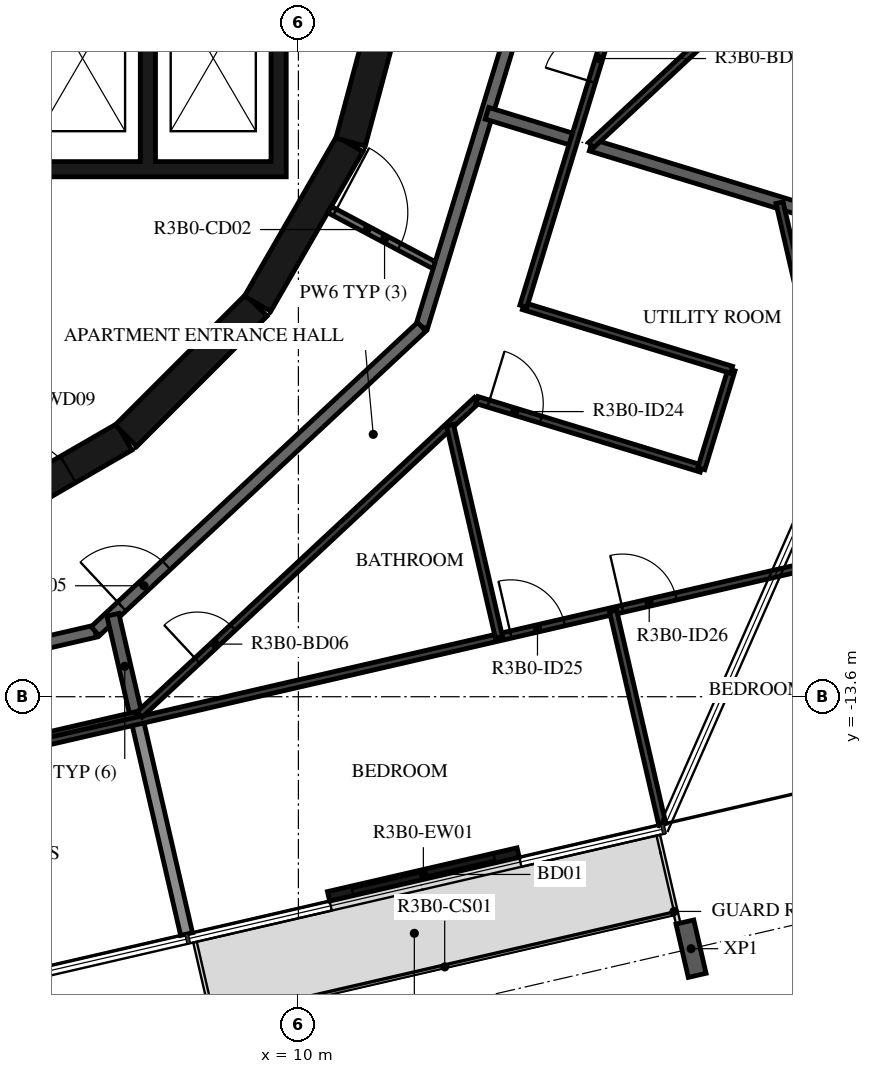
"""IFC4 building model, lengths in metres.
Left out: names, types, materials, properties, quantities, classifications, styles, units other than length and angle.
Written with IfcOpenShell. Run it as: python <this file> out.ifc"""

import sys

from ifc_helpers import new_model, si_unit, direction, frame, frame_2d, origin, origin_2d, place, context, subcontext, project, spatial, polyline, rectangle, i_section, outline, extrude, element, fill, save


model = new_model("IFC4")
c1 = context("Model", 3, precision=1e-05, world=origin(), true_north=direction((0.0, 1.0)))
c2 = subcontext(c1, "Body", "Model", "MODEL_VIEW")
j1 = project(units=[si_unit("LENGTHUNIT", "METRE"), si_unit("PLANEANGLEUNIT", "RADIAN")], contexts=[c1])
p1 = place(None, origin())
s1 = spatial("IfcSite", under=j1, at=p1, CompositionType="ELEMENT")
p2 = place(p1, origin())
s2 = spatial("IfcBuilding", under=s1, at=p2, CompositionType="ELEMENT")
p3 = place(p2, frame((0.0, 0.0, 127.4)))
s3 = spatial("IfcBuildingStorey", under=s2, at=p3, CompositionType="ELEMENT", Elevation=127.4)
p4 = place(p3, frame((16.457, -17.744, -0.38), z_axis=(0.0, 0.0, 1.0), x_axis=(-0.974370073419, -0.224951016948, 0.0)))
e1 = element("IfcColumn", 1, at=p4, inside=s3, PredefinedType="COLUMN", context=c2, shape_type="SweptSolid", body=[
    extrude(i_section(OverallWidth=0.3, OverallDepth=0.9, WebThickness=0.019, FlangeThickness=0.035, FilletRadius=0.03, at=origin_2d()), origin(), (0.0, 0.0, 1.0), 3.5),
])
p5 = place(p3, frame((10.496, -16.883, 0.0), z_axis=(0.0, 0.0, 1.0), x_axis=(0.974364187477, 0.224976510247, 0.0)))
e2 = element("IfcWall", 2, at=p5, inside=s3, PredefinedType="STANDARD", context=c2, shape_type="SweptSolid", body=[
    extrude(rectangle(XDim=3.2, YDim=0.16, at=frame_2d((1.6, 0.0))), origin(), (0.0, 0.0, 1.0), 3.12),
])
p6 = place(p5, frame((0.4, 0.0, 0.0)))
e3 = element("IfcOpeningElement", 3, at=p6, cuts=e2, PredefinedType="OPENING", context=c2, shape_type="SweptSolid", body=[
    extrude(rectangle(XDim=2.4, YDim=2.4, at=frame_2d((1.2, 1.2))), frame((0.0, 0.09, 0.0), z_axis=(0.0, -1.0, 0.0), x_axis=(1.0, 0.0, 0.0)), (0.0, 0.0, 1.0), 0.18),
])
p7 = place(p3, frame((4.51, -10.845, 0.0), z_axis=(0.0, 0.0, 1.0), x_axis=(0.865975092491, 0.500087131594, 0.0)))
e4 = element("IfcWall", 4, at=p7, inside=s3, PredefinedType="SHEAR", context=c2, shape_type="SweptSolid", body=[
    extrude(rectangle(XDim=3.033, YDim=0.5, at=frame_2d((1.516, 0.0))), origin(), (0.0, 0.0, 1.0), 3.12),
])
p8 = place(p7, frame((1.066, 0.0, 0.0)))
e5 = element("IfcOpeningElement", 5, at=p8, cuts=e4, PredefinedType="OPENING", context=c2, shape_type="SweptSolid", body=[
    extrude(rectangle(XDim=0.9, YDim=2.1, at=frame_2d((0.45, 1.05))), frame((0.0, 0.26, 0.0), z_axis=(0.0, -1.0, 0.0), x_axis=(1.0, 0.0, 0.0)), (0.0, 0.0, 1.0), 0.52),
])
p9 = place(p3, frame((7.164, -9.308, 0.0), z_axis=(0.0, 0.0, 1.0), x_axis=(0.707106781187, 0.707106781187, 0.0)))
e6 = element("IfcWall", 6, at=p9, inside=s3, PredefinedType="SHEAR", context=c2, shape_type="SweptSolid", body=[
    extrude(rectangle(XDim=3.032, YDim=0.5, at=frame_2d((1.516, 0.0))), origin(), (0.0, 0.0, 1.0), 3.12),
])
for number, where, z_axis, x_axis in (
    (7, (9.329, -7.137, 0.0), (0.0, 0.0, 1.0), (0.5, 0.866, 0.0)),
    (8, (10.858, -4.479, 0.0), (0.0, 0.0, 1.0), (0.259, 0.966, 0.0)),
):
    element("IfcWall", number, at=place(p3, frame(where, z_axis=z_axis, x_axis=x_axis)), inside=s3, PredefinedType="SHEAR", context=c2, shape_type="SweptSolid", body=[
        extrude(rectangle(XDim=3.033, YDim=0.5, at=frame_2d((1.516, 0.0))), origin(), (0.0, 0.0, 1.0), 3.12),
    ])
p10 = place(p3, origin())
e9 = element("IfcWall", 9, at=p10, inside=s3, PredefinedType="SHEAR", context=c2, shape_type="SweptSolid", body=[
    extrude(outline(polyline([(9.8, -5.05), (9.8, -4.8), (9.8, -1.9), (9.55, -1.9), (9.55, -4.8), (7.65, -4.8), (7.65, -1.9), (7.4, -1.9), (7.4, -4.8), (5.5, -4.8), (5.5, -1.9), (5.25, -1.9), (5.25, -4.8), (3.35, -4.8), (3.35, -1.9), (3.1, -1.9), (3.1, -4.8), (1.2, -4.8), (1.2, -1.9), (0.95, -1.9), (0.95, -4.8), (-0.95, -4.8), (-0.95, -1.9), (-1.2, -1.9), (-1.2, -4.8), (-5.25, -4.8), (-5.25, -1.9), (-5.5, -1.9), (-5.5, -4.8), (-7.4, -4.8), (-7.4, -1.9), (-7.65, -1.9), (-7.65, -4.8), (-9.55, -4.8), (-9.55, -1.9), (-9.8, -1.9), (-9.8, -4.8), (-9.8, -5.05), (9.8, -5.05)])), origin(), (0.0, 0.0, 1.0), 3.12),
])
p11 = place(p3, frame((10.511, -5.589, 0.0), z_axis=(0.0, 0.0, 1.0), x_axis=(0.882987820808, -0.469395897196, 0.0)))
e10 = element("IfcWall", 10, at=p11, inside=s3, PredefinedType="PARTITIONING", context=c2, shape_type="SweptSolid", body=[
    extrude(rectangle(XDim=2.052, YDim=0.12, at=frame_2d((1.026, 0.0))), origin(), (0.0, 0.0, 1.0), 3.12),
])
p12 = place(p11, frame((0.1, 0.0, 0.0)))
e11 = element("IfcOpeningElement", 11, at=p12, cuts=e10, PredefinedType="OPENING", context=c2, shape_type="SweptSolid", body=[
    extrude(rectangle(XDim=1.2, YDim=2.1, at=frame_2d((0.6, 1.05))), frame((0.0, 0.07, 0.0), z_axis=(0.0, -1.0, 0.0), x_axis=(1.0, 0.0, 0.0)), (0.0, 0.0, 1.0), 0.14),
])
p13 = place(p3, frame((12.028, -7.516, 0.0), z_axis=(0.0, 0.0, 1.0), x_axis=(0.292365533182, 0.956306642771, 0.0)))
e12 = element("IfcWall", 12, at=p13, inside=s3, PredefinedType="STANDARD", context=c2, shape_type="SweptSolid", body=[
    extrude(rectangle(XDim=7.342, YDim=0.2, at=frame_2d((3.671, 0.0))), origin(), (0.0, 0.0, 1.0), 3.12),
])
p14 = place(p3, frame((-0.495, -14.175, 0.0), z_axis=(0.0, 0.0, 1.0), x_axis=(0.974376622151, 0.224922649383, 0.0)))
e13 = element("IfcWall", 13, at=p14, inside=s3, PredefinedType="STANDARD", context=c2, shape_type="SweptSolid", body=[
    extrude(rectangle(XDim=7.342, YDim=0.2, at=frame_2d((3.671, 0.0))), origin(), (0.0, 0.0, 1.0), 3.12),
])
p15 = place(p3, frame((6.659, -12.523, 0.0), z_axis=(0.0, 0.0, 1.0), x_axis=(0.731350455479, 0.682001841105, 0.0)))
e14 = element("IfcWall", 14, at=p15, inside=s3, PredefinedType="STANDARD", context=c2, shape_type="SweptSolid", body=[
    extrude(rectangle(XDim=7.342, YDim=0.2, at=frame_2d((3.671, 0.0))), origin(), (0.0, 0.0, 1.0), 3.12),
])
p16 = place(p15, frame((0.597, 0.0, 0.0)))
e15 = element("IfcOpeningElement", 15, at=p16, cuts=e14, PredefinedType="OPENING", context=c2, shape_type="SweptSolid", body=[
    extrude(rectangle(XDim=1.0, YDim=2.1, at=frame_2d((0.5, 1.05))), frame((0.0, 0.11, 0.0), z_axis=(0.0, -1.0, 0.0), x_axis=(1.0, 0.0, 0.0)), (0.0, 0.0, 1.0), 0.22),
])
p17 = place(p3, frame((7.34, -13.946, 0.0), z_axis=(0.0, 0.0, 1.0), x_axis=(-0.224849249613, 0.974393562658, 0.0)))
e16 = element("IfcWall", 16, at=p17, inside=s3, PredefinedType="STANDARD", context=c2, shape_type="SweptSolid", body=[
    extrude(rectangle(XDim=1.738, YDim=0.2, at=frame_2d((0.869, 0.0))), origin(), (0.0, 0.0, 1.0), 3.12),
])
p18 = place(p3, frame((8.161, -17.504, 0.0), z_axis=(0.0, 0.0, 1.0), x_axis=(-0.224943703639, 0.9743717618, 0.0)))
e17 = element("IfcWall", 17, at=p18, inside=s3, PredefinedType="STANDARD", context=c2, shape_type="SweptSolid", body=[
    extrude(rectangle(XDim=3.6, YDim=0.2, at=frame_2d((1.8, 0.0))), origin(), (0.0, 0.0, 1.0), 2.73),
])
p19 = place(p3, frame((14.536, -4.444, 0.0), z_axis=(0.0, 0.0, 1.0), x_axis=(-0.956326299111, 0.292301230974, 0.0)))
e18 = element("IfcWall", 18, at=p19, inside=s3, PredefinedType="STANDARD", context=c2, shape_type="SweptSolid", body=[
    extrude(rectangle(XDim=1.5, YDim=0.2, at=frame_2d((0.75, 0.0))), origin(), (0.0, 0.0, 1.0), 3.12),
])
p20 = place(p3, frame((19.38, -5.925, 0.0), z_axis=(0.0, 0.0, 1.0), x_axis=(-0.956301542054, 0.29238221674, 0.0)))
e19 = element("IfcWall", 19, at=p20, inside=s3, PredefinedType="STANDARD", context=c2, shape_type="SweptSolid", body=[
    extrude(rectangle(XDim=4.775, YDim=0.2, at=frame_2d((2.387, 0.0))), origin(), (0.0, 0.0, 1.0), 3.12),
])
p21 = place(p3, frame((-0.549, -15.727, 0.0), z_axis=(0.0, 0.0, 1.0), x_axis=(0.97436829548, 0.224958717908, 0.0)))
e20 = element("IfcWall", 20, at=p21, inside=s3, PredefinedType="PARTITIONING", context=c2, shape_type="SweptSolid", body=[
    extrude(rectangle(XDim=8.087, YDim=0.12, at=frame_2d((4.044, 0.0))), origin(), (0.0, 0.0, 1.0), 3.12),
])
p22 = place(p3, frame((-13.939, -18.911, 0.0), z_axis=(0.0, 0.0, 1.0), x_axis=(0.974369607456, 0.224953035245, 0.0)))
e21 = element("IfcWall", 21, at=p22, inside=s3, PredefinedType="PARTITIONING", context=c2, shape_type="SweptSolid", body=[
    extrude(rectangle(XDim=33.934, YDim=0.12, at=frame_2d((16.967, 0.0))), origin(), (0.0, 0.0, 1.0), 3.12),
])
p23 = place(p22, frame((2.0, 0.0, 0.0)))
e22 = element("IfcOpeningElement", 22, at=p23, cuts=e21, PredefinedType="OPENING", context=c2, shape_type="SweptSolid", body=[
    extrude(rectangle(XDim=0.9, YDim=2.1, at=frame_2d((0.45, 1.05))), frame((0.0, 0.07, 0.0), z_axis=(0.0, -1.0, 0.0), x_axis=(1.0, 0.0, 0.0)), (0.0, 0.0, 1.0), 0.14),
])
p24 = place(p22, frame((28.154, 0.0, 0.0)))
e23 = element("IfcOpeningElement", 23, at=p24, cuts=e21, PredefinedType="OPENING", context=c2, shape_type="SweptSolid", body=[
    extrude(rectangle(XDim=0.9, YDim=2.1, at=frame_2d((0.45, 1.05))), frame((0.0, 0.07, 0.0), z_axis=(0.0, -1.0, 0.0), x_axis=(1.0, 0.0, 0.0)), (0.0, 0.0, 1.0), 0.14),
])
p25 = place(p22, frame((30.039, 0.0, 0.0)))
e24 = element("IfcOpeningElement", 24, at=p25, cuts=e21, PredefinedType="OPENING", context=c2, shape_type="SweptSolid", body=[
    extrude(rectangle(XDim=0.9, YDim=2.1, at=frame_2d((0.45, 1.05))), frame((0.0, 0.07, 0.0), z_axis=(0.0, -1.0, 0.0), x_axis=(1.0, 0.0, 0.0)), (0.0, 0.0, 1.0), 0.14),
])
p26 = place(p3, frame((7.388, -13.894, 0.0), z_axis=(0.0, 0.0, 1.0), x_axis=(0.731346321845, 0.682006273815, 0.0)))
e25 = element("IfcWall", 25, at=p26, inside=s3, PredefinedType="PARTITIONING", context=c2, shape_type="SweptSolid", body=[
    extrude(rectangle(XDim=7.585, YDim=0.12, at=frame_2d((3.793, 0.0))), origin(), (0.0, 0.0, 1.0), 3.12),
])
p27 = place(p26, frame((1.3, 0.0, 0.0)))
e26 = element("IfcOpeningElement", 26, at=p27, cuts=e25, PredefinedType="OPENING", context=c2, shape_type="SweptSolid", body=[
    extrude(rectangle(XDim=0.8, YDim=2.1, at=frame_2d((0.4, 1.05))), frame((0.0, 0.07, 0.0), z_axis=(0.0, -1.0, 0.0), x_axis=(1.0, 0.0, 0.0)), (0.0, 0.0, 1.0), 0.14),
])
p28 = place(p3, frame((12.935, -8.721, 0.0), z_axis=(0.0, 0.0, 1.0), x_axis=(0.956306865441, -0.292364804843, 0.0)))
e27 = element("IfcWall", 27, at=p28, inside=s3, PredefinedType="PARTITIONING", context=c2, shape_type="SweptSolid", body=[
    extrude(rectangle(XDim=3.859, YDim=0.12, at=frame_2d((1.929, 0.0))), origin(), (0.0, 0.0, 1.0), 3.12),
])
p29 = place(p28, frame((0.2, 0.0, 0.0)))
e28 = element("IfcOpeningElement", 28, at=p29, cuts=e27, PredefinedType="OPENING", context=c2, shape_type="SweptSolid", body=[
    extrude(rectangle(XDim=0.9, YDim=2.1, at=frame_2d((0.45, 1.05))), frame((0.0, 0.07, 0.0), z_axis=(0.0, -1.0, 0.0), x_axis=(1.0, 0.0, 0.0)), (0.0, 0.0, 1.0), 0.14),
])
p30 = place(p3, frame((16.625, -9.849, 0.0), z_axis=(0.0, 0.0, 1.0), x_axis=(0.292390011609, 0.956299158795, 0.0)))
e29 = element("IfcWall", 29, at=p30, inside=s3, PredefinedType="PARTITIONING", context=c2, shape_type="SweptSolid", body=[
    extrude(rectangle(XDim=1.7, YDim=0.12, at=frame_2d((0.85, 0.0))), origin(), (0.0, 0.0, 1.0), 3.12),
])
p31 = place(p3, frame((17.123, -8.223, 0.0), z_axis=(0.0, 0.0, 1.0), x_axis=(-0.956299657224, 0.292388381428, 0.0)))
e30 = element("IfcWall", 30, at=p31, inside=s3, PredefinedType="PARTITIONING", context=c2, shape_type="SweptSolid", body=[
    extrude(rectangle(XDim=3.579, YDim=0.12, at=frame_2d((1.79, 0.0))), origin(), (0.0, 0.0, 1.0), 3.12),
])
p32 = place(p3, frame((13.7, -7.177, 0.0), z_axis=(0.0, 0.0, 1.0), x_axis=(0.292382309758, 0.956301513614, 0.0)))
e31 = element("IfcWall", 31, at=p32, inside=s3, PredefinedType="PARTITIONING", context=c2, shape_type="SweptSolid", body=[
    extrude(rectangle(XDim=6.93, YDim=0.12, at=frame_2d((3.465, 0.0))), origin(), (0.0, 0.0, 1.0), 3.12),
])
p33 = place(p32, frame((3.858, 0.0, 0.0)))
e32 = element("IfcOpeningElement", 32, at=p33, cuts=e31, PredefinedType="OPENING", context=c2, shape_type="SweptSolid", body=[
    extrude(rectangle(XDim=0.8, YDim=2.1, at=frame_2d((0.4, 1.05))), frame((0.0, 0.07, 0.0), z_axis=(0.0, -1.0, 0.0), x_axis=(1.0, 0.0, 0.0)), (0.0, 0.0, 1.0), 0.14),
])
p34 = place(p3, frame((15.985, -15.698, 0.0), z_axis=(0.0, 0.0, 1.0), x_axis=(-0.224943703639, 0.9743717618, 0.0)))
e33 = element("IfcWall", 33, at=p34, inside=s3, PredefinedType="PARTITIONING", context=c2, shape_type="SweptSolid", body=[
    extrude(rectangle(XDim=3.6, YDim=0.12, at=frame_2d((1.8, 0.0))), origin(), (0.0, 0.0, 1.0), 2.73),
])
p35 = place(p3, frame((13.298, -12.623, 0.0), z_axis=(0.0, 0.0, 1.0), x_axis=(-0.22499394936, 0.974360160696, 0.0)))
e34 = element("IfcWall", 34, at=p35, inside=s3, PredefinedType="PARTITIONING", context=c2, shape_type="SweptSolid", body=[
    extrude(rectangle(XDim=3.581, YDim=0.12, at=frame_2d((1.791, 0.0))), origin(), (0.0, 0.0, 1.0), 3.12),
])
p36 = place(p3, frame((19.245, -11.25, 0.0), z_axis=(0.0, 0.0, 1.0), x_axis=(-0.224958805164, 0.974368275335, 0.0)))
e35 = element("IfcWall", 35, at=p36, inside=s3, PredefinedType="PARTITIONING", context=c2, shape_type="SweptSolid", body=[
    extrude(rectangle(XDim=5.926, YDim=0.12, at=frame_2d((2.963, 0.0))), origin(), (0.0, 0.0, 1.0), 3.12),
])
p37 = place(p36, frame((0.2, 0.0, 0.0)))
e36 = element("IfcOpeningElement", 36, at=p37, cuts=e35, PredefinedType="OPENING", context=c2, shape_type="SweptSolid", body=[
    extrude(rectangle(XDim=0.9, YDim=2.1, at=frame_2d((0.45, 1.05))), frame((0.0, 0.07, 0.0), z_axis=(0.0, -1.0, 0.0), x_axis=(1.0, 0.0, 0.0)), (0.0, 0.0, 1.0), 0.14),
])
p38 = place(p3, frame((18.577, -1.02, 0.0), z_axis=(0.0, 0.0, 1.0), x_axis=(-0.731348673524, -0.682003751994, 0.0)))
e37 = element("IfcWall", 37, at=p38, inside=s3, PredefinedType="PARTITIONING", context=c2, shape_type="SweptSolid", body=[
    extrude(rectangle(XDim=5.146, YDim=0.12, at=frame_2d((2.573, 0.0))), origin(), (0.0, 0.0, 1.0), 3.12),
])
p39 = place(p3, frame((22.054, -4.749, 0.0), z_axis=(0.0, 0.0, 1.0), x_axis=(-0.682014558945, 0.731338595582, 0.0)))
e38 = element("IfcWall", 38, at=p39, inside=s3, PredefinedType="PARTITIONING", context=c2, shape_type="SweptSolid", body=[
    extrude(rectangle(XDim=10.399, YDim=0.12, at=frame_2d((5.2, 0.0))), origin(), (0.0, 0.0, 1.0), 3.12),
])
p40 = place(p39, frame((0.8, 0.0, 0.0)))
e39 = element("IfcOpeningElement", 39, at=p40, cuts=e38, PredefinedType="OPENING", context=c2, shape_type="SweptSolid", body=[
    extrude(rectangle(XDim=0.9, YDim=2.1, at=frame_2d((0.45, 1.05))), frame((0.0, 0.07, 0.0), z_axis=(0.0, -1.0, 0.0), x_axis=(1.0, 0.0, 0.0)), (0.0, 0.0, 1.0), 0.14),
])
p41 = place(p6, origin())
e40 = element("IfcDoor", 40, at=p41, inside=s3, OperationType="DOUBLE_DOOR_SLIDING", PredefinedType="DOOR", context=c2, shape_type="SweptSolid", body=[
    extrude(rectangle(XDim=2.4, YDim=2.4, at=frame_2d((1.2, 1.2))), frame((0.0, 0.025, 0.0), z_axis=(0.0, -1.0, 0.0), x_axis=(1.0, 0.0, 0.0)), (0.0, 0.0, 1.0), 0.05),
])
fill(e3, e40)
p42 = place(p8, origin())
e41 = element("IfcDoor", 41, at=p42, inside=s3, OperationType="SINGLE_SWING_RIGHT", PredefinedType="DOOR", context=c2, shape_type="SweptSolid", body=[
    extrude(rectangle(XDim=0.9, YDim=2.1, at=frame_2d((0.45, 1.05))), frame((0.0, 0.025, 0.0), z_axis=(0.0, -1.0, 0.0), x_axis=(1.0, 0.0, 0.0)), (0.0, 0.0, 1.0), 0.05),
])
fill(e5, e41)
p43 = place(p16, origin())
e42 = element("IfcDoor", 42, at=p43, inside=s3, OperationType="SINGLE_SWING_RIGHT", PredefinedType="DOOR", context=c2, shape_type="SweptSolid", body=[
    extrude(rectangle(XDim=1.0, YDim=2.1, at=frame_2d((0.5, 1.05))), frame((0.0, 0.025, 0.0), z_axis=(0.0, -1.0, 0.0), x_axis=(1.0, 0.0, 0.0)), (0.0, 0.0, 1.0), 0.05),
])
fill(e15, e42)
p44 = place(p27, origin())
e43 = element("IfcDoor", 43, at=p44, inside=s3, OperationType="SINGLE_SWING_RIGHT", PredefinedType="DOOR", context=c2, shape_type="SweptSolid", body=[
    extrude(rectangle(XDim=0.8, YDim=2.1, at=frame_2d((0.4, 1.05))), frame((0.0, 0.025, 0.0), z_axis=(0.0, -1.0, 0.0), x_axis=(1.0, 0.0, 0.0)), (0.0, 0.0, 1.0), 0.05),
])
fill(e26, e43)
p45 = place(p29, origin())
e44 = element("IfcDoor", 44, at=p45, inside=s3, OperationType="SINGLE_SWING_RIGHT", PredefinedType="DOOR", context=c2, shape_type="SweptSolid", body=[
    extrude(rectangle(XDim=0.9, YDim=2.1, at=frame_2d((0.45, 1.05))), frame((0.0, 0.025, 0.0), z_axis=(0.0, -1.0, 0.0), x_axis=(1.0, 0.0, 0.0)), (0.0, 0.0, 1.0), 0.05),
])
fill(e28, e44)
p46 = place(p24, origin())
e45 = element("IfcDoor", 45, at=p46, inside=s3, OperationType="SINGLE_SWING_RIGHT", PredefinedType="DOOR", context=c2, shape_type="SweptSolid", body=[
    extrude(rectangle(XDim=0.9, YDim=2.1, at=frame_2d((0.45, 1.05))), frame((0.0, 0.025, 0.0), z_axis=(0.0, -1.0, 0.0), x_axis=(1.0, 0.0, 0.0)), (0.0, 0.0, 1.0), 0.05),
])
fill(e23, e45)
p47 = place(p25, origin())
e46 = element("IfcDoor", 46, at=p47, inside=s3, OperationType="SINGLE_SWING_RIGHT", PredefinedType="DOOR", context=c2, shape_type="SweptSolid", body=[
    extrude(rectangle(XDim=0.9, YDim=2.1, at=frame_2d((0.45, 1.05))), frame((0.0, 0.025, 0.0), z_axis=(0.0, -1.0, 0.0), x_axis=(1.0, 0.0, 0.0)), (0.0, 0.0, 1.0), 0.05),
])
fill(e24, e46)
p48 = place(p33, origin())
e47 = element("IfcDoor", 47, at=p48, inside=s3, OperationType="SINGLE_SWING_LEFT", PredefinedType="DOOR", context=c2, shape_type="SweptSolid", body=[
    extrude(rectangle(XDim=0.8, YDim=2.1, at=frame_2d((0.4, 1.05))), frame((0.0, 0.025, 0.0), z_axis=(0.0, -1.0, 0.0), x_axis=(1.0, 0.0, 0.0)), (0.0, 0.0, 1.0), 0.05),
])
fill(e32, e47)
p49 = place(p12, origin())
e48 = element("IfcDoor", 48, at=p49, inside=s3, OperationType="DOUBLE_DOOR_SINGLE_SWING", PredefinedType="DOOR", context=c2, shape_type="SweptSolid", body=[
    extrude(rectangle(XDim=1.2, YDim=2.1, at=frame_2d((0.6, 1.05))), frame((0.0, 0.025, 0.0), z_axis=(0.0, -1.0, 0.0), x_axis=(1.0, 0.0, 0.0)), (0.0, 0.0, 1.0), 0.05),
])
fill(e11, e48)
save(model, sys.argv[1])
